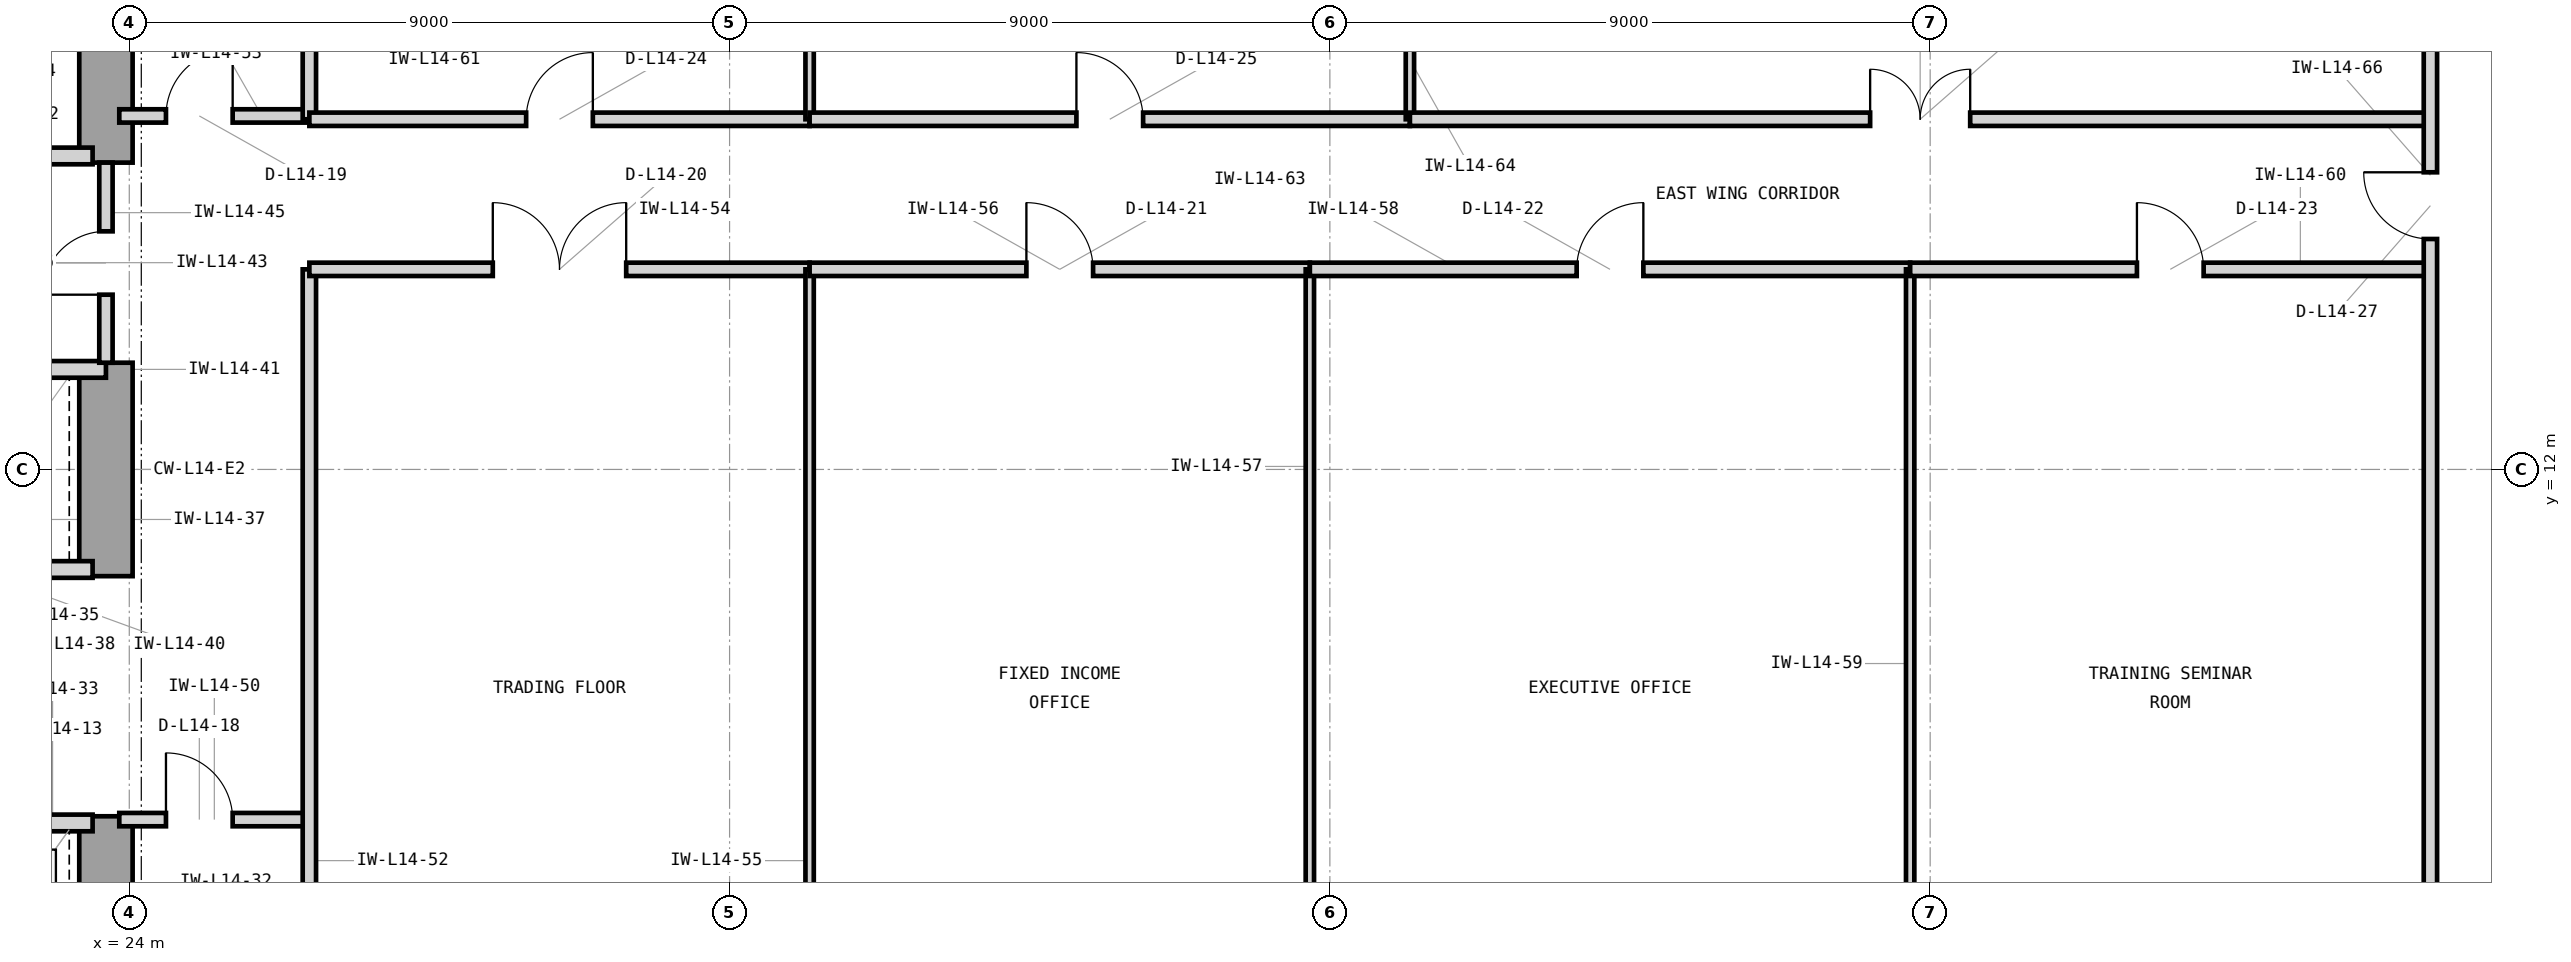
"""IFC4 building model, lengths in metres.
Left out: names, types, materials, properties, quantities, classifications, styles, units other than length and angle.
Written with IfcOpenShell. Run it as: python <this file> out.ifc"""

import sys

from ifc_helpers import new_model, si_unit, direction, frame, frame_2d, origin, place, context, subcontext, project, spatial, rectangle, extrude, element, fill, save


model = new_model("IFC4")
c1 = context("Model", 3, precision=1e-05, world=origin(), true_north=direction((0.0, 1.0)))
c2 = subcontext(c1, "Body", "Model", "MODEL_VIEW")
j1 = project(units=[si_unit("LENGTHUNIT", "METRE"), si_unit("PLANEANGLEUNIT", "RADIAN")], contexts=[c1])
p1 = place(None, origin())
s1 = spatial("IfcSite", under=j1, at=p1, CompositionType="ELEMENT")
p2 = place(p1, origin())
s2 = spatial("IfcBuilding", under=s1, at=p2, CompositionType="ELEMENT")
p3 = place(p2, frame((0.0, 0.0, 63.6)))
s3 = spatial("IfcBuildingStorey", under=s2, at=p3, CompositionType="ELEMENT", Elevation=63.6)
p4 = place(p3, frame((23.65, 3.75, 0.0), z_axis=(0.0, 0.0, 1.0), x_axis=(0.0, 1.0, 0.0)))
e1 = element("IfcWall", 1, at=p4, inside=s3, PredefinedType="SHEAR", context=c2, shape_type="SweptSolid", body=[
    extrude(rectangle(XDim=3.05, YDim=0.8, at=frame_2d((1.525, 0.0))), origin(), (0.0, 0.0, 1.0), 4.2),
])
p5 = place(p3, frame((23.65, 10.4, 0.0), z_axis=(0.0, 0.0, 1.0), x_axis=(0.0, 1.0, 0.0)))
e2 = element("IfcWall", 2, at=p5, inside=s3, PredefinedType="SHEAR", context=c2, shape_type="SweptSolid", body=[
    extrude(rectangle(XDim=3.2, YDim=0.8, at=frame_2d((1.6, 0.0))), origin(), (0.0, 0.0, 1.0), 4.2),
])
p6 = place(p3, frame((23.65, 16.6, 0.0), z_axis=(0.0, 0.0, 1.0), x_axis=(0.0, 1.0, 0.0)))
e3 = element("IfcWall", 3, at=p6, inside=s3, PredefinedType="SHEAR", context=c2, shape_type="SweptSolid", body=[
    extrude(rectangle(XDim=4.05, YDim=0.8, at=frame_2d((2.025, 0.0))), origin(), (0.0, 0.0, 1.0), 4.2),
])
p7 = place(p3, frame((21.05, 16.7, 0.0), z_axis=(0.0, 0.0, 1.0), x_axis=(1.0, 0.0, 0.0)))
e4 = element("IfcWall", 4, at=p7, inside=s3, PredefinedType="PARTITIONING", context=c2, shape_type="SweptSolid", body=[
    extrude(rectangle(XDim=2.4, YDim=0.25, at=frame_2d((1.2, 0.0))), origin(), (0.0, 0.0, 1.0), 3.426),
])
p8 = place(p3, frame((21.05, 6.7, 0.0), z_axis=(0.0, 0.0, 1.0), x_axis=(1.0, 0.0, 0.0)))
e5 = element("IfcWall", 5, at=p8, inside=s3, PredefinedType="PARTITIONING", context=c2, shape_type="SweptSolid", body=[
    extrude(rectangle(XDim=2.4, YDim=0.25, at=frame_2d((1.2, 0.0))), origin(), (0.0, 0.0, 1.0), 3.426),
])
p9 = place(p8, frame((0.48, 0.0, 0.0)))
e6 = element("IfcOpeningElement", 6, at=p9, cuts=e5, PredefinedType="OPENING", context=c2, shape_type="SweptSolid", body=[
    extrude(rectangle(XDim=1.15, YDim=2.25, at=frame_2d((0.575, 1.125))), frame((0.0, 0.135, 0.0), z_axis=(0.0, -1.0, 0.0), x_axis=(1.0, 0.0, 0.0)), (0.0, 0.0, 1.0), 0.27),
])
p10 = place(p3, frame((21.05, 10.5, 0.0), z_axis=(0.0, 0.0, 1.0), x_axis=(1.0, 0.0, 0.0)))
e7 = element("IfcWall", 7, at=p10, inside=s3, PredefinedType="PARTITIONING", context=c2, shape_type="SweptSolid", body=[
    extrude(rectangle(XDim=2.4, YDim=0.25, at=frame_2d((1.2, 0.0))), origin(), (0.0, 0.0, 1.0), 3.426),
])
p11 = place(p3, frame((14.7, 13.5, 0.0), z_axis=(0.0, 0.0, 1.0), x_axis=(1.0, 0.0, 0.0)))
e8 = element("IfcWall", 8, at=p11, inside=s3, PredefinedType="PARTITIONING", context=c2, shape_type="SweptSolid", body=[
    extrude(rectangle(XDim=8.95, YDim=0.25, at=frame_2d((4.475, 0.0))), origin(), (0.0, 0.0, 1.0), 3.426),
])
p12 = place(p3, frame((23.65, 13.6, 0.0), z_axis=(0.0, 0.0, 1.0), x_axis=(0.0, 1.0, 0.0)))
e9 = element("IfcWall", 9, at=p12, inside=s3, PredefinedType="PARTITIONING", context=c2, shape_type="SweptSolid", body=[
    extrude(rectangle(XDim=3.0, YDim=0.2, at=frame_2d((1.5, 0.0))), origin(), (0.0, 0.0, 1.0), 3.97),
])
p13 = place(p12, frame((1.02, 0.0, 0.0)))
e10 = element("IfcOpeningElement", 10, at=p13, cuts=e9, PredefinedType="OPENING", context=c2, shape_type="SweptSolid", body=[
    extrude(rectangle(XDim=0.95, YDim=2.1, at=frame_2d((0.475, 1.05))), frame((0.0, 0.11, 0.0), z_axis=(0.0, -1.0, 0.0), x_axis=(1.0, 0.0, 0.0)), (0.0, 0.0, 1.0), 0.22),
])
p14 = place(p3, frame((23.85, 6.75, 0.0), z_axis=(0.0, 0.0, 1.0), x_axis=(1.0, 0.0, 0.0)))
e11 = element("IfcWall", 11, at=p14, inside=s3, PredefinedType="PARTITIONING", context=c2, shape_type="SweptSolid", body=[
    extrude(rectangle(XDim=2.85, YDim=0.2, at=frame_2d((1.425, 0.0))), origin(), (0.0, 0.0, 1.0), 3.97),
])
p15 = place(p14, frame((0.7, 0.0, 0.0)))
e12 = element("IfcOpeningElement", 12, at=p15, cuts=e11, PredefinedType="OPENING", context=c2, shape_type="SweptSolid", body=[
    extrude(rectangle(XDim=1.0, YDim=2.15, at=frame_2d((0.5, 1.075))), frame((0.0, 0.11, 0.0), z_axis=(0.0, -1.0, 0.0), x_axis=(1.0, 0.0, 0.0)), (0.0, 0.0, 1.0), 0.22),
])
p16 = place(p3, frame((23.85, 17.3, 0.0), z_axis=(0.0, 0.0, 1.0), x_axis=(1.0, 0.0, 0.0)))
e13 = element("IfcWall", 13, at=p16, inside=s3, PredefinedType="PARTITIONING", context=c2, shape_type="SweptSolid", body=[
    extrude(rectangle(XDim=2.85, YDim=0.2, at=frame_2d((1.425, 0.0))), origin(), (0.0, 0.0, 1.0), 3.97),
])
p17 = place(p16, frame((0.7, 0.0, 0.0)))
e14 = element("IfcOpeningElement", 14, at=p17, cuts=e13, PredefinedType="OPENING", context=c2, shape_type="SweptSolid", body=[
    extrude(rectangle(XDim=1.0, YDim=2.15, at=frame_2d((0.5, 1.075))), frame((0.0, 0.11, 0.0), z_axis=(0.0, -1.0, 0.0), x_axis=(1.0, 0.0, 0.0)), (0.0, 0.0, 1.0), 0.22),
])
p18 = place(p3, frame((26.7, 3.18, 0.0), z_axis=(0.0, 0.0, 1.0), x_axis=(0.0, 1.0, 0.0)))
e15 = element("IfcWall", 15, at=p18, inside=s3, PredefinedType="PARTITIONING", context=c2, shape_type="SweptSolid", body=[
    extrude(rectangle(XDim=11.82, YDim=0.2, at=frame_2d((5.91, 0.0))), origin(), (0.0, 0.0, 1.0), 3.97),
])
p19 = place(p3, frame((26.7, 17.25, 0.0), z_axis=(0.0, 0.0, 1.0), x_axis=(0.0, 1.0, 0.0)))
e16 = element("IfcWall", 16, at=p19, inside=s3, PredefinedType="PARTITIONING", context=c2, shape_type="SweptSolid", body=[
    extrude(rectangle(XDim=3.57, YDim=0.2, at=frame_2d((1.785, 0.0))), origin(), (0.0, 0.0, 1.0), 3.97),
])
p20 = place(p3, frame((26.7, 15.0, 0.0), z_axis=(0.0, 0.0, 1.0), x_axis=(1.0, 0.0, 0.0)))
e17 = element("IfcWall", 17, at=p20, inside=s3, PredefinedType="PARTITIONING", context=c2, shape_type="SweptSolid", body=[
    extrude(rectangle(XDim=7.5, YDim=0.2, at=frame_2d((3.75, 0.0))), origin(), (0.0, 0.0, 1.0), 3.426),
])
p21 = place(p20, frame((2.75, 0.0, 0.0)))
e18 = element("IfcOpeningElement", 18, at=p21, cuts=e17, PredefinedType="OPENING", context=c2, shape_type="SweptSolid", body=[
    extrude(rectangle(XDim=2.0, YDim=2.5, at=frame_2d((1.0, 1.25))), frame((0.0, 0.11, 0.0), z_axis=(0.0, -1.0, 0.0), x_axis=(1.0, 0.0, 0.0)), (0.0, 0.0, 1.0), 0.22),
])
p22 = place(p3, frame((34.2, 3.18, 0.0), z_axis=(0.0, 0.0, 1.0), x_axis=(0.0, 1.0, 0.0)))
e19 = element("IfcWall", 19, at=p22, inside=s3, PredefinedType="PARTITIONING", context=c2, shape_type="SweptSolid", body=[
    extrude(rectangle(XDim=11.82, YDim=0.125, at=frame_2d((5.91, 0.0))), origin(), (0.0, 0.0, 1.0), 3.97),
])
p23 = place(p3, frame((34.2, 15.0, 0.0), z_axis=(0.0, 0.0, 1.0), x_axis=(1.0, 0.0, 0.0)))
e20 = element("IfcWall", 20, at=p23, inside=s3, PredefinedType="PARTITIONING", context=c2, shape_type="SweptSolid", body=[
    extrude(rectangle(XDim=7.5, YDim=0.2, at=frame_2d((3.75, 0.0))), origin(), (0.0, 0.0, 1.0), 3.426),
])
p24 = place(p23, frame((3.25, 0.0, 0.0)))
e21 = element("IfcOpeningElement", 21, at=p24, cuts=e20, PredefinedType="OPENING", context=c2, shape_type="SweptSolid", body=[
    extrude(rectangle(XDim=1.0, YDim=2.15, at=frame_2d((0.5, 1.075))), frame((0.0, 0.11, 0.0), z_axis=(0.0, -1.0, 0.0), x_axis=(1.0, 0.0, 0.0)), (0.0, 0.0, 1.0), 0.22),
])
p25 = place(p3, frame((41.7, 3.18, 0.0), z_axis=(0.0, 0.0, 1.0), x_axis=(0.0, 1.0, 0.0)))
e22 = element("IfcWall", 22, at=p25, inside=s3, PredefinedType="PARTITIONING", context=c2, shape_type="SweptSolid", body=[
    extrude(rectangle(XDim=11.82, YDim=0.125, at=frame_2d((5.91, 0.0))), origin(), (0.0, 0.0, 1.0), 3.97),
])
p26 = place(p3, frame((41.7, 15.0, 0.0), z_axis=(0.0, 0.0, 1.0), x_axis=(1.0, 0.0, 0.0)))
e23 = element("IfcWall", 23, at=p26, inside=s3, PredefinedType="PARTITIONING", context=c2, shape_type="SweptSolid", body=[
    extrude(rectangle(XDim=9.0, YDim=0.2, at=frame_2d((4.5, 0.0))), origin(), (0.0, 0.0, 1.0), 3.426),
])
p27 = place(p26, frame((4.0, 0.0, 0.0)))
e24 = element("IfcOpeningElement", 24, at=p27, cuts=e23, PredefinedType="OPENING", context=c2, shape_type="SweptSolid", body=[
    extrude(rectangle(XDim=1.0, YDim=2.15, at=frame_2d((0.5, 1.075))), frame((0.0, 0.11, 0.0), z_axis=(0.0, -1.0, 0.0), x_axis=(1.0, 0.0, 0.0)), (0.0, 0.0, 1.0), 0.22),
])
p28 = place(p3, frame((50.7, 3.18, 0.0), z_axis=(0.0, 0.0, 1.0), x_axis=(0.0, 1.0, 0.0)))
e25 = element("IfcWall", 25, at=p28, inside=s3, PredefinedType="PARTITIONING", context=c2, shape_type="SweptSolid", body=[
    extrude(rectangle(XDim=11.82, YDim=0.125, at=frame_2d((5.91, 0.0))), origin(), (0.0, 0.0, 1.0), 3.97),
])
p29 = place(p3, frame((50.7, 15.0, 0.0), z_axis=(0.0, 0.0, 1.0), x_axis=(1.0, 0.0, 0.0)))
e26 = element("IfcWall", 26, at=p29, inside=s3, PredefinedType="PARTITIONING", context=c2, shape_type="SweptSolid", body=[
    extrude(rectangle(XDim=7.8, YDim=0.2, at=frame_2d((3.9, 0.0))), origin(), (0.0, 0.0, 1.0), 3.426),
])
p30 = place(p29, frame((3.4, 0.0, 0.0)))
e27 = element("IfcOpeningElement", 27, at=p30, cuts=e26, PredefinedType="OPENING", context=c2, shape_type="SweptSolid", body=[
    extrude(rectangle(XDim=1.0, YDim=2.15, at=frame_2d((0.5, 1.075))), frame((0.0, 0.11, 0.0), z_axis=(0.0, -1.0, 0.0), x_axis=(1.0, 0.0, 0.0)), (0.0, 0.0, 1.0), 0.22),
])
p31 = place(p3, frame((26.7, 17.25, 0.0), z_axis=(0.0, 0.0, 1.0), x_axis=(1.0, 0.0, 0.0)))
e28 = element("IfcWall", 28, at=p31, inside=s3, PredefinedType="PARTITIONING", context=c2, shape_type="SweptSolid", body=[
    extrude(rectangle(XDim=7.5, YDim=0.2, at=frame_2d((3.75, 0.0))), origin(), (0.0, 0.0, 1.0), 3.97),
])
p32 = place(p31, frame((3.25, 0.0, 0.0)))
e29 = element("IfcOpeningElement", 29, at=p32, cuts=e28, PredefinedType="OPENING", context=c2, shape_type="SweptSolid", body=[
    extrude(rectangle(XDim=1.0, YDim=2.15, at=frame_2d((0.5, 1.075))), frame((0.0, 0.11, 0.0), z_axis=(0.0, -1.0, 0.0), x_axis=(1.0, 0.0, 0.0)), (0.0, 0.0, 1.0), 0.22),
])
p33 = place(p3, frame((34.2, 17.25, 0.0), z_axis=(0.0, 0.0, 1.0), x_axis=(0.0, 1.0, 0.0)))
e30 = element("IfcWall", 30, at=p33, inside=s3, PredefinedType="PARTITIONING", context=c2, shape_type="SweptSolid", body=[
    extrude(rectangle(XDim=3.57, YDim=0.125, at=frame_2d((1.785, 0.0))), origin(), (0.0, 0.0, 1.0), 3.97),
])
p34 = place(p3, frame((34.2, 17.25, 0.0), z_axis=(0.0, 0.0, 1.0), x_axis=(1.0, 0.0, 0.0)))
e31 = element("IfcWall", 31, at=p34, inside=s3, PredefinedType="PARTITIONING", context=c2, shape_type="SweptSolid", body=[
    extrude(rectangle(XDim=9.0, YDim=0.2, at=frame_2d((4.5, 0.0))), origin(), (0.0, 0.0, 1.0), 3.97),
])
p35 = place(p34, frame((4.0, 0.0, 0.0)))
e32 = element("IfcOpeningElement", 32, at=p35, cuts=e31, PredefinedType="OPENING", context=c2, shape_type="SweptSolid", body=[
    extrude(rectangle(XDim=1.0, YDim=2.15, at=frame_2d((0.5, 1.075))), frame((0.0, 0.11, 0.0), z_axis=(0.0, -1.0, 0.0), x_axis=(1.0, 0.0, 0.0)), (0.0, 0.0, 1.0), 0.22),
])
p36 = place(p3, frame((43.2, 17.25, 0.0), z_axis=(0.0, 0.0, 1.0), x_axis=(0.0, 1.0, 0.0)))
e33 = element("IfcWall", 33, at=p36, inside=s3, PredefinedType="PARTITIONING", context=c2, shape_type="SweptSolid", body=[
    extrude(rectangle(XDim=3.57, YDim=0.125, at=frame_2d((1.785, 0.0))), origin(), (0.0, 0.0, 1.0), 3.97),
])
p37 = place(p3, frame((43.2, 17.25, 0.0), z_axis=(0.0, 0.0, 1.0), x_axis=(1.0, 0.0, 0.0)))
e34 = element("IfcWall", 34, at=p37, inside=s3, PredefinedType="PARTITIONING", context=c2, shape_type="SweptSolid", body=[
    extrude(rectangle(XDim=15.3, YDim=0.2, at=frame_2d((7.65, 0.0))), origin(), (0.0, 0.0, 1.0), 3.97),
])
p38 = place(p37, frame((6.9, 0.0, 0.0)))
e35 = element("IfcOpeningElement", 35, at=p38, cuts=e34, PredefinedType="OPENING", context=c2, shape_type="SweptSolid", body=[
    extrude(rectangle(XDim=1.5, YDim=2.3, at=frame_2d((0.75, 1.15))), frame((0.0, 0.11, 0.0), z_axis=(0.0, -1.0, 0.0), x_axis=(1.0, 0.0, 0.0)), (0.0, 0.0, 1.0), 0.22),
])
p39 = place(p3, frame((58.5, 3.18, 0.0), z_axis=(0.0, 0.0, 1.0), x_axis=(0.0, 1.0, 0.0)))
e36 = element("IfcWall", 36, at=p39, inside=s3, PredefinedType="PARTITIONING", context=c2, shape_type="SweptSolid", body=[
    extrude(rectangle(XDim=17.64, YDim=0.2, at=frame_2d((8.82, 0.0))), origin(), (0.0, 0.0, 1.0), 3.97),
])
p40 = place(p39, frame((12.275, 0.0, 0.0)))
e37 = element("IfcOpeningElement", 37, at=p40, cuts=e36, PredefinedType="OPENING", context=c2, shape_type="SweptSolid", body=[
    extrude(rectangle(XDim=1.0, YDim=2.15, at=frame_2d((0.5, 1.075))), frame((0.0, 0.11, 0.0), z_axis=(0.0, -1.0, 0.0), x_axis=(1.0, 0.0, 0.0)), (0.0, 0.0, 1.0), 0.22),
])
p41 = place(p13, origin())
e38 = element("IfcDoor", 38, at=p41, inside=s3, OperationType="SINGLE_SWING_LEFT", PredefinedType="DOOR", context=c2, shape_type="SweptSolid", body=[
    extrude(rectangle(XDim=0.95, YDim=2.1, at=frame_2d((0.475, 1.05))), frame((0.0, 0.025, 0.0), z_axis=(0.0, -1.0, 0.0), x_axis=(1.0, 0.0, 0.0)), (0.0, 0.0, 1.0), 0.05),
])
fill(e10, e38)
p42 = place(p15, origin())
e39 = element("IfcDoor", 39, at=p42, inside=s3, OperationType="SINGLE_SWING_LEFT", PredefinedType="DOOR", context=c2, shape_type="SweptSolid", body=[
    extrude(rectangle(XDim=1.0, YDim=2.15, at=frame_2d((0.5, 1.075))), frame((0.0, 0.025, 0.0), z_axis=(0.0, -1.0, 0.0), x_axis=(1.0, 0.0, 0.0)), (0.0, 0.0, 1.0), 0.05),
])
fill(e12, e39)
p43 = place(p17, origin())
e40 = element("IfcDoor", 40, at=p43, inside=s3, OperationType="SINGLE_SWING_RIGHT", PredefinedType="DOOR", context=c2, shape_type="SweptSolid", body=[
    extrude(rectangle(XDim=1.0, YDim=2.15, at=frame_2d((0.5, 1.075))), frame((0.0, 0.025, 0.0), z_axis=(0.0, -1.0, 0.0), x_axis=(1.0, 0.0, 0.0)), (0.0, 0.0, 1.0), 0.05),
])
fill(e14, e40)
p44 = place(p21, origin())
e41 = element("IfcDoor", 41, at=p44, inside=s3, OperationType="DOUBLE_DOOR_SINGLE_SWING", PredefinedType="DOOR", context=c2, shape_type="SweptSolid", body=[
    extrude(rectangle(XDim=2.0, YDim=2.5, at=frame_2d((1.0, 1.25))), frame((0.0, 0.025, 0.0), z_axis=(0.0, -1.0, 0.0), x_axis=(1.0, 0.0, 0.0)), (0.0, 0.0, 1.0), 0.05),
])
fill(e18, e41)
p45 = place(p24, origin())
e42 = element("IfcDoor", 42, at=p45, inside=s3, OperationType="SINGLE_SWING_LEFT", PredefinedType="DOOR", context=c2, shape_type="SweptSolid", body=[
    extrude(rectangle(XDim=1.0, YDim=2.15, at=frame_2d((0.5, 1.075))), frame((0.0, 0.025, 0.0), z_axis=(0.0, -1.0, 0.0), x_axis=(1.0, 0.0, 0.0)), (0.0, 0.0, 1.0), 0.05),
])
fill(e21, e42)
p46 = place(p27, origin())
e43 = element("IfcDoor", 43, at=p46, inside=s3, OperationType="SINGLE_SWING_RIGHT", PredefinedType="DOOR", context=c2, shape_type="SweptSolid", body=[
    extrude(rectangle(XDim=1.0, YDim=2.15, at=frame_2d((0.5, 1.075))), frame((0.0, 0.025, 0.0), z_axis=(0.0, -1.0, 0.0), x_axis=(1.0, 0.0, 0.0)), (0.0, 0.0, 1.0), 0.05),
])
fill(e24, e43)
p47 = place(p30, origin())
e44 = element("IfcDoor", 44, at=p47, inside=s3, OperationType="SINGLE_SWING_LEFT", PredefinedType="DOOR", context=c2, shape_type="SweptSolid", body=[
    extrude(rectangle(XDim=1.0, YDim=2.15, at=frame_2d((0.5, 1.075))), frame((0.0, 0.025, 0.0), z_axis=(0.0, -1.0, 0.0), x_axis=(1.0, 0.0, 0.0)), (0.0, 0.0, 1.0), 0.05),
])
fill(e27, e44)
p48 = place(p32, origin())
e45 = element("IfcDoor", 45, at=p48, inside=s3, OperationType="SINGLE_SWING_RIGHT", PredefinedType="DOOR", context=c2, shape_type="SweptSolid", body=[
    extrude(rectangle(XDim=1.0, YDim=2.15, at=frame_2d((0.5, 1.075))), frame((0.0, 0.025, 0.0), z_axis=(0.0, -1.0, 0.0), x_axis=(1.0, 0.0, 0.0)), (0.0, 0.0, 1.0), 0.05),
])
fill(e29, e45)
p49 = place(p35, origin())
e46 = element("IfcDoor", 46, at=p49, inside=s3, OperationType="SINGLE_SWING_LEFT", PredefinedType="DOOR", context=c2, shape_type="SweptSolid", body=[
    extrude(rectangle(XDim=1.0, YDim=2.15, at=frame_2d((0.5, 1.075))), frame((0.0, 0.025, 0.0), z_axis=(0.0, -1.0, 0.0), x_axis=(1.0, 0.0, 0.0)), (0.0, 0.0, 1.0), 0.05),
])
fill(e32, e46)
p50 = place(p38, origin())
e47 = element("IfcDoor", 47, at=p50, inside=s3, OperationType="DOUBLE_DOOR_SINGLE_SWING", PredefinedType="DOOR", context=c2, shape_type="SweptSolid", body=[
    extrude(rectangle(XDim=1.5, YDim=2.3, at=frame_2d((0.75, 1.15))), frame((0.0, 0.025, 0.0), z_axis=(0.0, -1.0, 0.0), x_axis=(1.0, 0.0, 0.0)), (0.0, 0.0, 1.0), 0.05),
])
fill(e35, e47)
p51 = place(p40, origin())
e48 = element("IfcDoor", 48, at=p51, inside=s3, OperationType="SINGLE_SWING_RIGHT", PredefinedType="DOOR", context=c2, shape_type="SweptSolid", body=[
    extrude(rectangle(XDim=1.0, YDim=2.15, at=frame_2d((0.5, 1.075))), frame((0.0, 0.025, 0.0), z_axis=(0.0, -1.0, 0.0), x_axis=(1.0, 0.0, 0.0)), (0.0, 0.0, 1.0), 0.05),
])
fill(e37, e48)
save(model, sys.argv[1])
